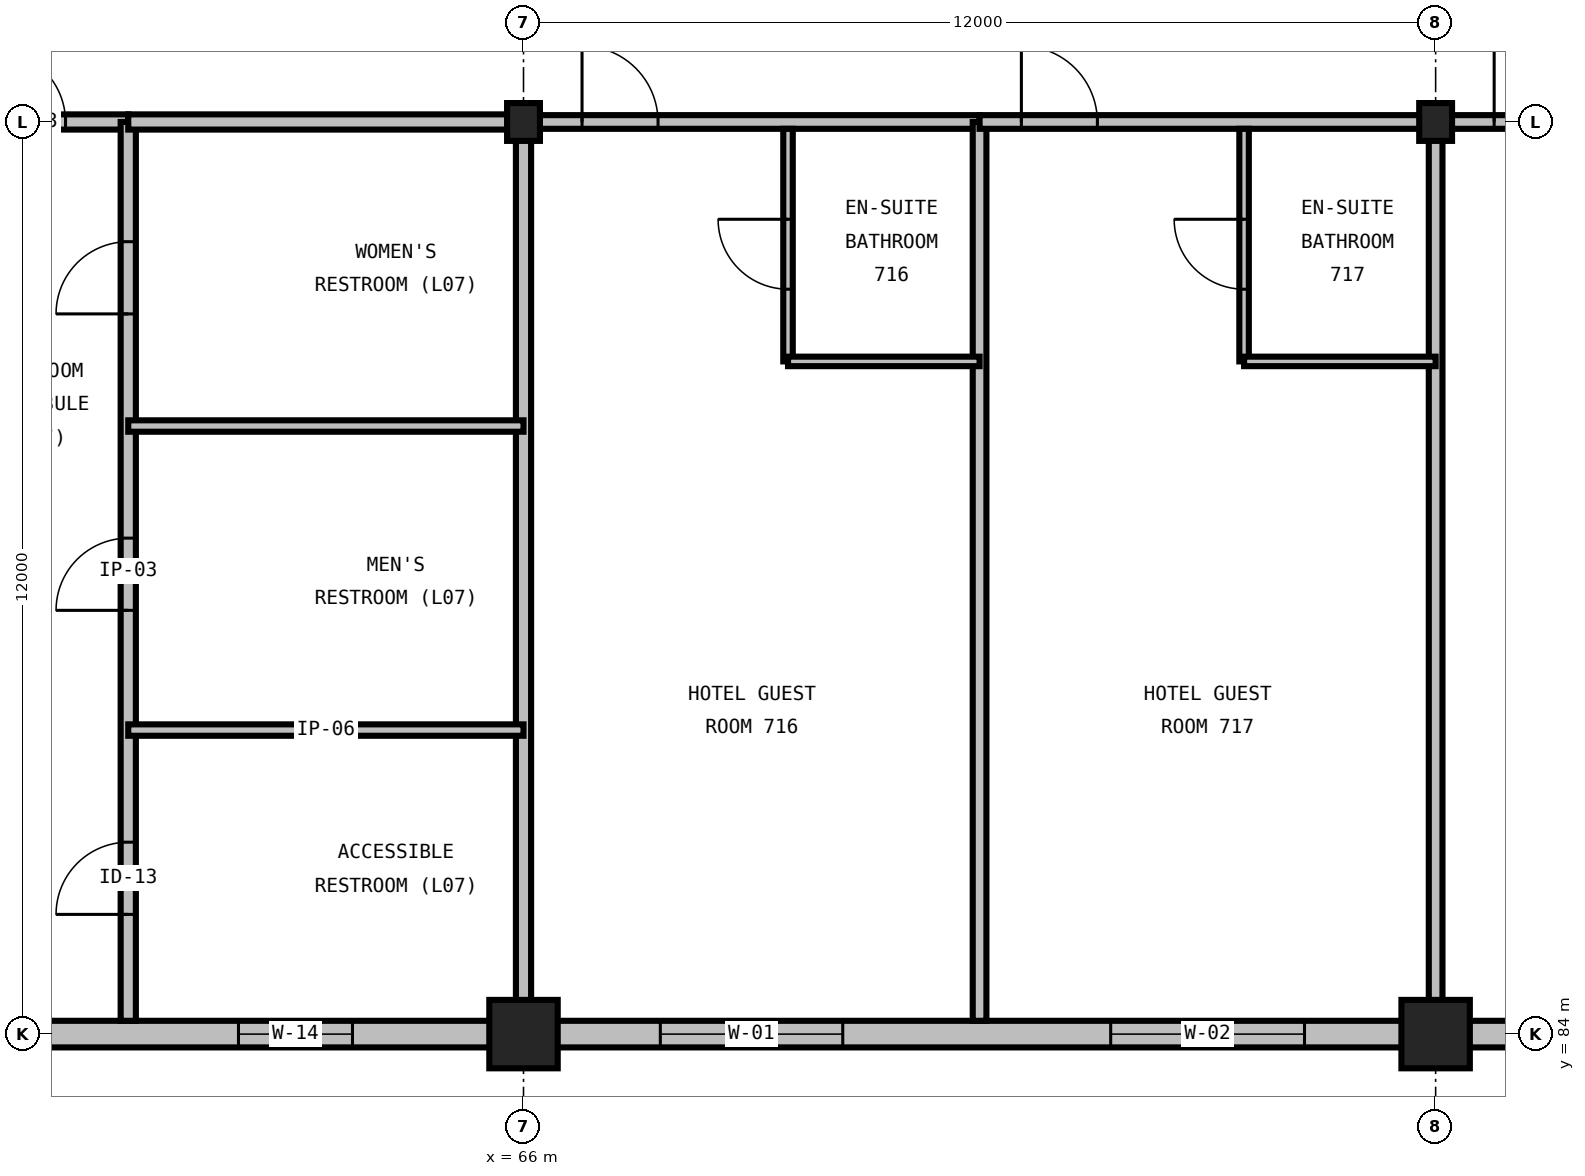
"""IFC4 building model, lengths in metres.
Left out: names, types, materials, properties, quantities, classifications, styles, units other than length and angle.
Written with IfcOpenShell. Run it as: python <this file> out.ifc"""

import sys

from ifc_helpers import new_model, si_unit, direction, frame, frame_2d, origin, origin_2d, place, context, subcontext, project, spatial, rectangle, i_section, extrude, element, fill, save


model = new_model("IFC4")
c1 = context("Model", 3, precision=1e-05, world=origin(), true_north=direction((0.0, 1.0)))
c2 = subcontext(c1, "Body", "Model", "MODEL_VIEW")
j1 = project(units=[si_unit("LENGTHUNIT", "METRE"), si_unit("PLANEANGLEUNIT", "RADIAN")], contexts=[c1])
p1 = place(None, origin())
s1 = spatial("IfcSite", under=j1, at=p1, CompositionType="ELEMENT")
p2 = place(p1, origin())
s2 = spatial("IfcBuilding", under=s1, at=p2, CompositionType="ELEMENT")
p3 = place(p2, frame((0.0, 0.0, 34.8)))
s3 = spatial("IfcBuildingStorey", under=s2, at=p3, CompositionType="ELEMENT", Elevation=34.8)
p4 = place(p3, frame((66.0, 84.0, 0.0), z_axis=(0.0, 0.0, 1.0), x_axis=(1.0, 0.0, 0.0)))
e1 = element("IfcColumn", 1, at=p4, inside=s3, PredefinedType="COLUMN", context=c2, shape_type="SweptSolid", body=[
    extrude(rectangle(XDim=0.9, YDim=0.9, at=origin_2d()), origin(), (0.0, 0.0, 1.0), 3.6),
])
p5 = place(p3, frame((66.0, 96.0, 0.0), z_axis=(0.0, 0.0, 1.0), x_axis=(1.0, 0.0, 0.0)))
e2 = element("IfcColumn", 2, at=p5, inside=s3, PredefinedType="COLUMN", context=c2, shape_type="SweptSolid", body=[
    extrude(i_section(OverallWidth=0.432, OverallDepth=0.498, WebThickness=0.056, FlangeThickness=0.089, FilletRadius=0.031, at=origin_2d()), origin(), (0.0, 0.0, 1.0), 3.6),
])
p6 = place(p3, frame((78.0, 84.0, 0.0), z_axis=(0.0, 0.0, 1.0), x_axis=(1.0, 0.0, 0.0)))
e3 = element("IfcColumn", 3, at=p6, inside=s3, PredefinedType="COLUMN", context=c2, shape_type="SweptSolid", body=[
    extrude(rectangle(XDim=0.9, YDim=0.9, at=origin_2d()), origin(), (0.0, 0.0, 1.0), 3.6),
])
p7 = place(p3, frame((78.0, 96.0, 0.0), z_axis=(0.0, 0.0, 1.0), x_axis=(1.0, 0.0, 0.0)))
e4 = element("IfcColumn", 4, at=p7, inside=s3, PredefinedType="COLUMN", context=c2, shape_type="SweptSolid", body=[
    extrude(i_section(OverallWidth=0.432, OverallDepth=0.498, WebThickness=0.056, FlangeThickness=0.089, FilletRadius=0.031, at=origin_2d()), origin(), (0.0, 0.0, 1.0), 3.6),
])
p8 = place(p3, frame((54.0, 84.0, 0.0), z_axis=(0.0, 0.0, 1.0), x_axis=(1.0, 0.0, 0.0)))
e5 = element("IfcWall", 5, at=p8, inside=s3, PredefinedType="STANDARD", context=c2, shape_type="SweptSolid", body=[
    extrude(rectangle(XDim=12.0, YDim=0.35, at=frame_2d((6.0, 0.0))), origin(), (0.0, 0.0, 1.0), 2.486),
])
p9 = place(p8, frame((2.3, 0.0, 1.0)))
e6 = element("IfcOpeningElement", 6, at=p9, cuts=e5, PredefinedType="OPENING", context=c2, shape_type="SweptSolid", body=[
    extrude(rectangle(XDim=1.4, YDim=1.4, at=frame_2d((0.7, 0.7))), frame((0.0, 0.19, 0.0), z_axis=(0.0, -1.0, 0.0), x_axis=(1.0, 0.0, 0.0)), (0.0, 0.0, 1.0), 0.38),
])
p10 = place(p8, frame((8.25, 0.0, 1.0)))
e7 = element("IfcOpeningElement", 7, at=p10, cuts=e5, PredefinedType="OPENING", context=c2, shape_type="SweptSolid", body=[
    extrude(rectangle(XDim=1.5, YDim=1.35, at=frame_2d((0.75, 0.675))), frame((0.0, 0.19, 0.0), z_axis=(0.0, -1.0, 0.0), x_axis=(1.0, 0.0, 0.0)), (0.0, 0.0, 1.0), 0.38),
])
p11 = place(p3, frame((66.0, 84.0, 0.0), z_axis=(0.0, 0.0, 1.0), x_axis=(1.0, 0.0, 0.0)))
e8 = element("IfcWall", 8, at=p11, inside=s3, PredefinedType="STANDARD", context=c2, shape_type="SweptSolid", body=[
    extrude(rectangle(XDim=12.0, YDim=0.35, at=frame_2d((6.0, 0.0))), origin(), (0.0, 0.0, 1.0), 2.486),
])
p12 = place(p11, frame((1.8, 0.0, 0.75)))
e9 = element("IfcOpeningElement", 9, at=p12, cuts=e8, PredefinedType="OPENING", context=c2, shape_type="SweptSolid", body=[
    extrude(rectangle(XDim=2.4, YDim=1.65, at=frame_2d((1.2, 0.825))), frame((0.0, 0.19, 0.0), z_axis=(0.0, -1.0, 0.0), x_axis=(1.0, 0.0, 0.0)), (0.0, 0.0, 1.0), 0.38),
])
p13 = place(p11, frame((7.725, 0.0, 0.75)))
e10 = element("IfcOpeningElement", 10, at=p13, cuts=e8, PredefinedType="OPENING", context=c2, shape_type="SweptSolid", body=[
    extrude(rectangle(XDim=2.55, YDim=1.65, at=frame_2d((1.275, 0.825))), frame((0.0, 0.19, 0.0), z_axis=(0.0, -1.0, 0.0), x_axis=(1.0, 0.0, 0.0)), (0.0, 0.0, 1.0), 0.38),
])
p14 = place(p3, frame((78.0, 84.0, 0.0), z_axis=(0.0, 0.0, 1.0), x_axis=(1.0, 0.0, 0.0)))
e11 = element("IfcWall", 11, at=p14, inside=s3, PredefinedType="STANDARD", context=c2, shape_type="SweptSolid", body=[
    extrude(rectangle(XDim=6.0, YDim=0.35, at=frame_2d((3.0, 0.0))), origin(), (0.0, 0.0, 1.0), 2.486),
])
p15 = place(p14, frame((1.8, 0.0, 0.75)))
e12 = element("IfcOpeningElement", 12, at=p15, cuts=e11, PredefinedType="OPENING", context=c2, shape_type="SweptSolid", body=[
    extrude(rectangle(XDim=2.4, YDim=1.65, at=frame_2d((1.2, 0.825))), frame((0.0, 0.19, 0.0), z_axis=(0.0, -1.0, 0.0), x_axis=(1.0, 0.0, 0.0)), (0.0, 0.0, 1.0), 0.38),
])
p16 = place(p3, frame((58.4, 96.0, 0.0), z_axis=(0.0, 0.0, 1.0), x_axis=(1.0, 0.0, 0.0)))
e13 = element("IfcWall", 13, at=p16, inside=s3, PredefinedType="PARTITIONING", context=c2, shape_type="SweptSolid", body=[
    extrude(rectangle(XDim=2.4, YDim=0.2, at=frame_2d((1.2, 0.0))), origin(), (0.0, 0.0, 1.0), 2.359),
])
p17 = place(p16, frame((0.625, 0.0, 0.0)))
e14 = element("IfcOpeningElement", 14, at=p17, cuts=e13, PredefinedType="OPENING", context=c2, shape_type="SweptSolid", body=[
    extrude(rectangle(XDim=0.95, YDim=2.15, at=frame_2d((0.475, 1.075))), frame((0.0, 0.115, 0.0), z_axis=(0.0, -1.0, 0.0), x_axis=(1.0, 0.0, 0.0)), (0.0, 0.0, 1.0), 0.23),
])
p18 = place(p3, frame((60.8, 84.175, 0.0), z_axis=(0.0, 0.0, 1.0), x_axis=(0.0, 1.0, 0.0)))
e15 = element("IfcWall", 15, at=p18, inside=s3, PredefinedType="PARTITIONING", context=c2, shape_type="SweptSolid", body=[
    extrude(rectangle(XDim=11.825, YDim=0.2, at=frame_2d((5.913, 0.0))), origin(), (0.0, 0.0, 1.0), 3.29),
])
p19 = place(p18, frame((1.4, 0.0, 0.0)))
e16 = element("IfcOpeningElement", 16, at=p19, cuts=e15, PredefinedType="OPENING", context=c2, shape_type="SweptSolid", body=[
    extrude(rectangle(XDim=0.95, YDim=2.15, at=frame_2d((0.475, 1.075))), frame((0.0, 0.115, 0.0), z_axis=(0.0, -1.0, 0.0), x_axis=(1.0, 0.0, 0.0)), (0.0, 0.0, 1.0), 0.23),
])
p20 = place(p18, frame((5.4, 0.0, 0.0)))
e17 = element("IfcOpeningElement", 17, at=p20, cuts=e15, PredefinedType="OPENING", context=c2, shape_type="SweptSolid", body=[
    extrude(rectangle(XDim=0.95, YDim=2.15, at=frame_2d((0.475, 1.075))), frame((0.0, 0.115, 0.0), z_axis=(0.0, -1.0, 0.0), x_axis=(1.0, 0.0, 0.0)), (0.0, 0.0, 1.0), 0.23),
])
p21 = place(p18, frame((9.3, 0.0, 0.0)))
e18 = element("IfcOpeningElement", 18, at=p21, cuts=e15, PredefinedType="OPENING", context=c2, shape_type="SweptSolid", body=[
    extrude(rectangle(XDim=0.95, YDim=2.15, at=frame_2d((0.475, 1.075))), frame((0.0, 0.115, 0.0), z_axis=(0.0, -1.0, 0.0), x_axis=(1.0, 0.0, 0.0)), (0.0, 0.0, 1.0), 0.23),
])
p22 = place(p3, frame((66.0, 84.175, 0.0), z_axis=(0.0, 0.0, 1.0), x_axis=(0.0, 1.0, 0.0)))
e19 = element("IfcWall", 19, at=p22, inside=s3, PredefinedType="PARTITIONING", context=c2, shape_type="SweptSolid", body=[
    extrude(rectangle(XDim=11.825, YDim=0.2, at=frame_2d((5.913, 0.0))), origin(), (0.0, 0.0, 1.0), 2.59),
])
p23 = place(p3, frame((60.8, 96.0, 0.0), z_axis=(0.0, 0.0, 1.0), x_axis=(1.0, 0.0, 0.0)))
e20 = element("IfcWall", 20, at=p23, inside=s3, PredefinedType="PARTITIONING", context=c2, shape_type="SweptSolid", body=[
    extrude(rectangle(XDim=5.2, YDim=0.2, at=frame_2d((2.6, 0.0))), origin(), (0.0, 0.0, 1.0), 2.359),
])
for number, where, z_axis, x_axis in (
    (21, (60.8, 88.0, 0.0), (0.0, 0.0, 1.0), (1.0, 0.0, 0.0)),
    (22, (60.8, 92.0, 0.0), (0.0, 0.0, 1.0), (1.0, 0.0, 0.0)),
):
    element("IfcWall", number, at=place(p3, frame(where, z_axis=z_axis, x_axis=x_axis)), inside=s3, PredefinedType="PARTITIONING", context=c2, shape_type="SweptSolid", body=[
        extrude(rectangle(XDim=5.2, YDim=0.15, at=frame_2d((2.6, 0.0))), origin(), (0.0, 0.0, 1.0), 3.29),
    ])
p24 = place(p3, frame((66.0, 96.0, 0.0), z_axis=(0.0, 0.0, 1.0), x_axis=(1.0, 0.0, 0.0)))
e23 = element("IfcWall", 23, at=p24, inside=s3, PredefinedType="PARTITIONING", context=c2, shape_type="SweptSolid", body=[
    extrude(rectangle(XDim=6.0, YDim=0.18, at=frame_2d((3.0, 0.0))), origin(), (0.0, 0.0, 1.0), 2.664),
])
p25 = place(p24, frame((0.77, 0.0, 0.0)))
e24 = element("IfcOpeningElement", 24, at=p25, cuts=e23, PredefinedType="OPENING", context=c2, shape_type="SweptSolid", body=[
    extrude(rectangle(XDim=1.0, YDim=2.15, at=frame_2d((0.5, 1.075))), frame((0.0, 0.105, 0.0), z_axis=(0.0, -1.0, 0.0), x_axis=(1.0, 0.0, 0.0)), (0.0, 0.0, 1.0), 0.21),
])
p26 = place(p3, frame((72.0, 84.175, 0.0), z_axis=(0.0, 0.0, 1.0), x_axis=(0.0, 1.0, 0.0)))
e25 = element("IfcWall", 25, at=p26, inside=s3, PredefinedType="PARTITIONING", context=c2, shape_type="SweptSolid", body=[
    extrude(rectangle(XDim=11.825, YDim=0.18, at=frame_2d((5.913, 0.0))), origin(), (0.0, 0.0, 1.0), 3.29),
])
p27 = place(p3, frame((69.48, 92.85, 0.0), z_axis=(0.0, 0.0, 1.0), x_axis=(0.0, 1.0, 0.0)))
e26 = element("IfcWall", 26, at=p27, inside=s3, PredefinedType="PARTITIONING", context=c2, shape_type="SweptSolid", body=[
    extrude(rectangle(XDim=3.06, YDim=0.125, at=frame_2d((1.53, 0.0))), origin(), (0.0, 0.0, 1.0), 3.29),
])
p28 = place(p27, frame((0.95, 0.0, 0.0)))
e27 = element("IfcOpeningElement", 27, at=p28, cuts=e26, PredefinedType="OPENING", context=c2, shape_type="SweptSolid", body=[
    extrude(rectangle(XDim=0.92, YDim=2.1, at=frame_2d((0.46, 1.05))), frame((0.0, 0.077, 0.0), z_axis=(0.0, -1.0, 0.0), x_axis=(1.0, 0.0, 0.0)), (0.0, 0.0, 1.0), 0.155),
])
p29 = place(p3, frame((69.48, 92.85, 0.0), z_axis=(0.0, 0.0, 1.0), x_axis=(1.0, 0.0, 0.0)))
e28 = element("IfcWall", 28, at=p29, inside=s3, PredefinedType="PARTITIONING", context=c2, shape_type="SweptSolid", body=[
    extrude(rectangle(XDim=2.52, YDim=0.125, at=frame_2d((1.26, 0.0))), origin(), (0.0, 0.0, 1.0), 3.29),
])
p30 = place(p3, frame((72.0, 96.0, 0.0), z_axis=(0.0, 0.0, 1.0), x_axis=(1.0, 0.0, 0.0)))
e29 = element("IfcWall", 29, at=p30, inside=s3, PredefinedType="PARTITIONING", context=c2, shape_type="SweptSolid", body=[
    extrude(rectangle(XDim=6.0, YDim=0.18, at=frame_2d((3.0, 0.0))), origin(), (0.0, 0.0, 1.0), 2.664),
])
p31 = place(p30, frame((0.55, 0.0, 0.0)))
e30 = element("IfcOpeningElement", 30, at=p31, cuts=e29, PredefinedType="OPENING", context=c2, shape_type="SweptSolid", body=[
    extrude(rectangle(XDim=1.0, YDim=2.15, at=frame_2d((0.5, 1.075))), frame((0.0, 0.105, 0.0), z_axis=(0.0, -1.0, 0.0), x_axis=(1.0, 0.0, 0.0)), (0.0, 0.0, 1.0), 0.21),
])
p32 = place(p3, frame((78.0, 84.175, 0.0), z_axis=(0.0, 0.0, 1.0), x_axis=(0.0, 1.0, 0.0)))
e31 = element("IfcWall", 31, at=p32, inside=s3, PredefinedType="PARTITIONING", context=c2, shape_type="SweptSolid", body=[
    extrude(rectangle(XDim=11.825, YDim=0.18, at=frame_2d((5.913, 0.0))), origin(), (0.0, 0.0, 1.0), 2.59),
])
p33 = place(p3, frame((75.48, 92.85, 0.0), z_axis=(0.0, 0.0, 1.0), x_axis=(0.0, 1.0, 0.0)))
e32 = element("IfcWall", 32, at=p33, inside=s3, PredefinedType="PARTITIONING", context=c2, shape_type="SweptSolid", body=[
    extrude(rectangle(XDim=3.06, YDim=0.125, at=frame_2d((1.53, 0.0))), origin(), (0.0, 0.0, 1.0), 3.29),
])
p34 = place(p33, frame((0.95, 0.0, 0.0)))
e33 = element("IfcOpeningElement", 33, at=p34, cuts=e32, PredefinedType="OPENING", context=c2, shape_type="SweptSolid", body=[
    extrude(rectangle(XDim=0.92, YDim=2.1, at=frame_2d((0.46, 1.05))), frame((0.0, 0.077, 0.0), z_axis=(0.0, -1.0, 0.0), x_axis=(1.0, 0.0, 0.0)), (0.0, 0.0, 1.0), 0.155),
])
p35 = place(p3, frame((75.48, 92.85, 0.0), z_axis=(0.0, 0.0, 1.0), x_axis=(1.0, 0.0, 0.0)))
e34 = element("IfcWall", 34, at=p35, inside=s3, PredefinedType="PARTITIONING", context=c2, shape_type="SweptSolid", body=[
    extrude(rectangle(XDim=2.52, YDim=0.125, at=frame_2d((1.26, 0.0))), origin(), (0.0, 0.0, 1.0), 3.29),
])
p36 = place(p3, frame((78.0, 96.0, 0.0), z_axis=(0.0, 0.0, 1.0), x_axis=(1.0, 0.0, 0.0)))
e35 = element("IfcWall", 35, at=p36, inside=s3, PredefinedType="PARTITIONING", context=c2, shape_type="SweptSolid", body=[
    extrude(rectangle(XDim=6.0, YDim=0.18, at=frame_2d((3.0, 0.0))), origin(), (0.0, 0.0, 1.0), 2.736),
])
p37 = place(p36, frame((0.77, 0.0, 0.0)))
e36 = element("IfcOpeningElement", 36, at=p37, cuts=e35, PredefinedType="OPENING", context=c2, shape_type="SweptSolid", body=[
    extrude(rectangle(XDim=1.0, YDim=2.15, at=frame_2d((0.5, 1.075))), frame((0.0, 0.105, 0.0), z_axis=(0.0, -1.0, 0.0), x_axis=(1.0, 0.0, 0.0)), (0.0, 0.0, 1.0), 0.21),
])
p38 = place(p10, origin())
e37 = element("IfcWindow", 37, at=p38, inside=s3, PartitioningType="SINGLE_PANEL", PredefinedType="WINDOW", context=c2, shape_type="SweptSolid", body=[
    extrude(rectangle(XDim=1.5, YDim=1.35, at=frame_2d((0.75, 0.675))), frame((0.0, 0.03, 0.0), z_axis=(0.0, -1.0, 0.0), x_axis=(1.0, 0.0, 0.0)), (0.0, 0.0, 1.0), 0.06),
])
fill(e7, e37)
p39 = place(p12, origin())
e38 = element("IfcWindow", 38, at=p39, inside=s3, PartitioningType="DOUBLE_PANEL_VERTICAL", PredefinedType="WINDOW", context=c2, shape_type="SweptSolid", body=[
    extrude(rectangle(XDim=2.4, YDim=1.65, at=frame_2d((1.2, 0.825))), frame((0.0, 0.03, 0.0), z_axis=(0.0, -1.0, 0.0), x_axis=(1.0, 0.0, 0.0)), (0.0, 0.0, 1.0), 0.06),
])
fill(e9, e38)
p40 = place(p13, origin())
e39 = element("IfcWindow", 39, at=p40, inside=s3, PartitioningType="DOUBLE_PANEL_VERTICAL", PredefinedType="WINDOW", context=c2, shape_type="SweptSolid", body=[
    extrude(rectangle(XDim=2.55, YDim=1.65, at=frame_2d((1.275, 0.825))), frame((0.0, 0.03, 0.0), z_axis=(0.0, -1.0, 0.0), x_axis=(1.0, 0.0, 0.0)), (0.0, 0.0, 1.0), 0.06),
])
fill(e10, e39)
p41 = place(p17, origin())
e40 = element("IfcDoor", 40, at=p41, inside=s3, OperationType="SINGLE_SWING_LEFT", PredefinedType="DOOR", context=c2, shape_type="SweptSolid", body=[
    extrude(rectangle(XDim=0.95, YDim=2.15, at=frame_2d((0.475, 1.075))), frame((0.0, 0.025, 0.0), z_axis=(0.0, -1.0, 0.0), x_axis=(1.0, 0.0, 0.0)), (0.0, 0.0, 1.0), 0.05),
])
fill(e14, e40)
p42 = place(p19, origin())
e41 = element("IfcDoor", 41, at=p42, inside=s3, OperationType="SINGLE_SWING_LEFT", PredefinedType="DOOR", context=c2, shape_type="SweptSolid", body=[
    extrude(rectangle(XDim=0.95, YDim=2.15, at=frame_2d((0.475, 1.075))), frame((0.0, 0.025, 0.0), z_axis=(0.0, -1.0, 0.0), x_axis=(1.0, 0.0, 0.0)), (0.0, 0.0, 1.0), 0.05),
])
fill(e16, e41)
p43 = place(p20, origin())
e42 = element("IfcDoor", 42, at=p43, inside=s3, OperationType="SINGLE_SWING_LEFT", PredefinedType="DOOR", context=c2, shape_type="SweptSolid", body=[
    extrude(rectangle(XDim=0.95, YDim=2.15, at=frame_2d((0.475, 1.075))), frame((0.0, 0.025, 0.0), z_axis=(0.0, -1.0, 0.0), x_axis=(1.0, 0.0, 0.0)), (0.0, 0.0, 1.0), 0.05),
])
fill(e17, e42)
p44 = place(p21, origin())
e43 = element("IfcDoor", 43, at=p44, inside=s3, OperationType="SINGLE_SWING_LEFT", PredefinedType="DOOR", context=c2, shape_type="SweptSolid", body=[
    extrude(rectangle(XDim=0.95, YDim=2.15, at=frame_2d((0.475, 1.075))), frame((0.0, 0.025, 0.0), z_axis=(0.0, -1.0, 0.0), x_axis=(1.0, 0.0, 0.0)), (0.0, 0.0, 1.0), 0.05),
])
fill(e18, e43)
p45 = place(p25, origin())
e44 = element("IfcDoor", 44, at=p45, inside=s3, OperationType="SINGLE_SWING_LEFT", PredefinedType="DOOR", context=c2, shape_type="SweptSolid", body=[
    extrude(rectangle(XDim=1.0, YDim=2.15, at=frame_2d((0.5, 1.075))), frame((0.0, 0.025, 0.0), z_axis=(0.0, -1.0, 0.0), x_axis=(1.0, 0.0, 0.0)), (0.0, 0.0, 1.0), 0.05),
])
fill(e24, e44)
p46 = place(p28, origin())
e45 = element("IfcDoor", 45, at=p46, inside=s3, OperationType="SINGLE_SWING_RIGHT", PredefinedType="DOOR", context=c2, shape_type="SweptSolid", body=[
    extrude(rectangle(XDim=0.92, YDim=2.1, at=frame_2d((0.46, 1.05))), frame((0.0, 0.025, 0.0), z_axis=(0.0, -1.0, 0.0), x_axis=(1.0, 0.0, 0.0)), (0.0, 0.0, 1.0), 0.05),
])
fill(e27, e45)
p47 = place(p31, origin())
e46 = element("IfcDoor", 46, at=p47, inside=s3, OperationType="SINGLE_SWING_LEFT", PredefinedType="DOOR", context=c2, shape_type="SweptSolid", body=[
    extrude(rectangle(XDim=1.0, YDim=2.15, at=frame_2d((0.5, 1.075))), frame((0.0, 0.025, 0.0), z_axis=(0.0, -1.0, 0.0), x_axis=(1.0, 0.0, 0.0)), (0.0, 0.0, 1.0), 0.05),
])
fill(e30, e46)
p48 = place(p34, origin())
e47 = element("IfcDoor", 47, at=p48, inside=s3, OperationType="SINGLE_SWING_RIGHT", PredefinedType="DOOR", context=c2, shape_type="SweptSolid", body=[
    extrude(rectangle(XDim=0.92, YDim=2.1, at=frame_2d((0.46, 1.05))), frame((0.0, 0.025, 0.0), z_axis=(0.0, -1.0, 0.0), x_axis=(1.0, 0.0, 0.0)), (0.0, 0.0, 1.0), 0.05),
])
fill(e33, e47)
p49 = place(p37, origin())
e48 = element("IfcDoor", 48, at=p49, inside=s3, OperationType="SINGLE_SWING_LEFT", PredefinedType="DOOR", context=c2, shape_type="SweptSolid", body=[
    extrude(rectangle(XDim=1.0, YDim=2.15, at=frame_2d((0.5, 1.075))), frame((0.0, 0.025, 0.0), z_axis=(0.0, -1.0, 0.0), x_axis=(1.0, 0.0, 0.0)), (0.0, 0.0, 1.0), 0.05),
])
fill(e36, e48)
save(model, sys.argv[1])
